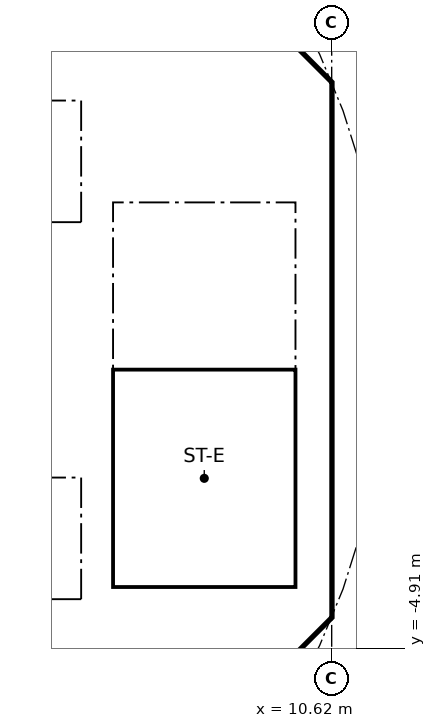
"""IFC4 building model, lengths in metres.
Left out: names, types, materials, properties, quantities, classifications, styles, units other than length and angle.
Written with IfcOpenShell. Run it as: python <this file> out.ifc"""

import sys

from ifc_helpers import new_model, si_unit, direction, frame, frame_2d, origin, place, context, subcontext, project, spatial, polyline, rectangle, outline, extrude, element, fill, save


model = new_model("IFC4")
c1 = context("Model", 3, precision=1e-05, world=origin(), true_north=direction((0.0, 1.0)))
c2 = subcontext(c1, "Body", "Model", "MODEL_VIEW")
j1 = project(units=[si_unit("LENGTHUNIT", "METRE"), si_unit("PLANEANGLEUNIT", "RADIAN")], contexts=[c1])
p1 = place(None, origin())
s1 = spatial("IfcSite", under=j1, at=p1, CompositionType="ELEMENT")
p2 = place(p1, origin())
s2 = spatial("IfcBuilding", under=s1, at=p2, CompositionType="ELEMENT")
p3 = place(p2, frame((0.0, 0.0, 184.4)))
s3 = spatial("IfcBuildingStorey", under=s2, at=p3, CompositionType="ELEMENT", Elevation=184.4)
p4 = place(p3, frame((9.988, 4.613, 0.0), z_axis=(0.0, 0.0, 1.0), x_axis=(-0.707106781187, 0.707106781187, 0.0)))
e1 = element("IfcWall", 1, at=p4, inside=s3, PredefinedType="SHEAR", context=c2, shape_type="SweptSolid", body=[
    extrude(rectangle(XDim=7.602, YDim=0.6, at=frame_2d((3.801, 0.0))), origin(), (0.0, 0.0, 1.0), 3.44),
])
p5 = place(p4, frame((3.201, 0.0, 0.0)))
e2 = element("IfcOpeningElement", 2, at=p5, cuts=e1, PredefinedType="OPENING", context=c2, shape_type="SweptSolid", body=[
    extrude(rectangle(XDim=1.2, YDim=2.1, at=frame_2d((0.6, 1.05))), frame((0.0, 0.31, 0.0), z_axis=(0.0, -1.0, 0.0), x_axis=(1.0, 0.0, 0.0)), (0.0, 0.0, 1.0), 0.62),
])
p6 = place(p3, frame((4.613, -9.988, 0.0), z_axis=(0.0, 0.0, 1.0), x_axis=(0.707106781187, 0.707106781187, 0.0)))
e3 = element("IfcWall", 3, at=p6, inside=s3, PredefinedType="SHEAR", context=c2, shape_type="SweptSolid", body=[
    extrude(rectangle(XDim=7.602, YDim=0.6, at=frame_2d((3.801, 0.0))), origin(), (0.0, 0.0, 1.0), 3.44),
])
p7 = place(p6, frame((3.201, 0.0, 0.0)))
e4 = element("IfcOpeningElement", 4, at=p7, cuts=e3, PredefinedType="OPENING", context=c2, shape_type="SweptSolid", body=[
    extrude(rectangle(XDim=1.2, YDim=2.1, at=frame_2d((0.6, 1.05))), frame((0.0, 0.31, 0.0), z_axis=(0.0, -1.0, 0.0), x_axis=(1.0, 0.0, 0.0)), (0.0, 0.0, 1.0), 0.62),
])
p8 = place(p3, frame((-6.7, 2.0, 0.0), z_axis=(0.0, 0.0, 1.0), x_axis=(1.0, 0.0, 0.0)))
e5 = element("IfcWall", 5, at=p8, inside=s3, PredefinedType="SOLIDWALL", context=c2, shape_type="SweptSolid", body=[
    extrude(rectangle(XDim=13.4, YDim=0.2, at=frame_2d((6.7, 0.0))), origin(), (0.0, 0.0, 1.0), 3.44),
])
p9 = place(p8, frame((7.25, 0.0, 0.0)))
e6 = element("IfcOpeningElement", 6, at=p9, cuts=e5, PredefinedType="OPENING", context=c2, shape_type="SweptSolid", body=[
    extrude(rectangle(XDim=1.1, YDim=2.1, at=frame_2d((0.55, 1.05))), frame((0.0, 0.11, 0.0), z_axis=(0.0, -1.0, 0.0), x_axis=(1.0, 0.0, 0.0)), (0.0, 0.0, 1.0), 0.22),
])
p10 = place(p8, frame((9.45, 0.0, 0.0)))
e7 = element("IfcOpeningElement", 7, at=p10, cuts=e5, PredefinedType="OPENING", context=c2, shape_type="SweptSolid", body=[
    extrude(rectangle(XDim=1.1, YDim=2.1, at=frame_2d((0.55, 1.05))), frame((0.0, 0.11, 0.0), z_axis=(0.0, -1.0, 0.0), x_axis=(1.0, 0.0, 0.0)), (0.0, 0.0, 1.0), 0.22),
])
p11 = place(p8, frame((1.85, 0.0, 0.0)))
e8 = element("IfcOpeningElement", 8, at=p11, cuts=e5, PredefinedType="OPENING", context=c2, shape_type="SweptSolid", body=[
    extrude(rectangle(XDim=0.9, YDim=2.1, at=frame_2d((0.45, 1.05))), frame((0.0, 0.11, 0.0), z_axis=(0.0, -1.0, 0.0), x_axis=(1.0, 0.0, 0.0)), (0.0, 0.0, 1.0), 0.22),
])
p12 = place(p8, frame((5.15, 0.0, 0.0)))
e9 = element("IfcOpeningElement", 9, at=p12, cuts=e5, PredefinedType="OPENING", context=c2, shape_type="SweptSolid", body=[
    extrude(rectangle(XDim=0.9, YDim=2.1, at=frame_2d((0.45, 1.05))), frame((0.0, 0.11, 0.0), z_axis=(0.0, -1.0, 0.0), x_axis=(1.0, 0.0, 0.0)), (0.0, 0.0, 1.0), 0.22),
])
p13 = place(p3, frame((6.7, 4.0, 0.0), z_axis=(0.0, 0.0, 1.0), x_axis=(1.0, 0.0, 0.0)))
e10 = element("IfcWall", 10, at=p13, inside=s3, PredefinedType="SOLIDWALL", context=c2, shape_type="SweptSolid", body=[
    extrude(rectangle(XDim=3.325, YDim=0.2, at=frame_2d((1.662, 0.0))), origin(), (0.0, 0.0, 1.0), 3.44),
])
p14 = place(p13, frame((1.25, 0.0, 0.0)))
e11 = element("IfcOpeningElement", 11, at=p14, cuts=e10, PredefinedType="OPENING", context=c2, shape_type="SweptSolid", body=[
    extrude(rectangle(XDim=1.1, YDim=2.1, at=frame_2d((0.55, 1.05))), frame((0.0, 0.11, 0.0), z_axis=(0.0, -1.0, 0.0), x_axis=(1.0, 0.0, 0.0)), (0.0, 0.0, 1.0), 0.22),
])
p15 = place(p3, frame((-6.7, -2.0, 0.0), z_axis=(0.0, 0.0, 1.0), x_axis=(1.0, 0.0, 0.0)))
e12 = element("IfcWall", 12, at=p15, inside=s3, PredefinedType="SOLIDWALL", context=c2, shape_type="SweptSolid", body=[
    extrude(rectangle(XDim=13.4, YDim=0.2, at=frame_2d((6.7, 0.0))), origin(), (0.0, 0.0, 1.0), 3.44),
])
p16 = place(p15, frame((5.05, 0.0, 0.0)))
e13 = element("IfcOpeningElement", 13, at=p16, cuts=e12, PredefinedType="OPENING", context=c2, shape_type="SweptSolid", body=[
    extrude(rectangle(XDim=1.1, YDim=2.1, at=frame_2d((0.55, 1.05))), frame((0.0, 0.11, 0.0), z_axis=(0.0, -1.0, 0.0), x_axis=(1.0, 0.0, 0.0)), (0.0, 0.0, 1.0), 0.22),
])
p17 = place(p15, frame((7.25, 0.0, 0.0)))
e14 = element("IfcOpeningElement", 14, at=p17, cuts=e12, PredefinedType="OPENING", context=c2, shape_type="SweptSolid", body=[
    extrude(rectangle(XDim=1.1, YDim=2.1, at=frame_2d((0.55, 1.05))), frame((0.0, 0.11, 0.0), z_axis=(0.0, -1.0, 0.0), x_axis=(1.0, 0.0, 0.0)), (0.0, 0.0, 1.0), 0.22),
])
p18 = place(p15, frame((1.85, 0.0, 0.0)))
e15 = element("IfcOpeningElement", 15, at=p18, cuts=e12, PredefinedType="OPENING", context=c2, shape_type="SweptSolid", body=[
    extrude(rectangle(XDim=0.9, YDim=2.1, at=frame_2d((0.45, 1.05))), frame((0.0, 0.11, 0.0), z_axis=(0.0, -1.0, 0.0), x_axis=(1.0, 0.0, 0.0)), (0.0, 0.0, 1.0), 0.22),
])
p19 = place(p3, origin())
e16 = element("IfcWall", 16, at=p19, inside=s3, PredefinedType="SHEAR", context=c2, shape_type="SweptSolid", body=[
    extrude(outline(polyline([(9.776, -4.401), (10.025, -4.152), (10.025, -3.801), (10.025, 4.152), (9.776, 4.401), (10.2, 4.825), (10.625, 4.401), (10.625, -4.401), (10.2, -4.825), (9.776, -4.401)])), origin(), (0.0, 0.0, 1.0), 3.44),
])
p20 = place(p3, origin())
e17 = element("IfcWall", 17, at=p20, inside=s3, PredefinedType="SOLIDWALL", context=c2, shape_type="SweptSolid", body=[
    extrude(outline(polyline([(-6.7, -2.1), (-6.5, -2.1), (-6.5, -4.1), (-2.3, -4.1), (-2.3, -2.1), (-2.1, -2.1), (-2.1, -4.1), (-0.1, -4.1), (-0.1, -2.1), (0.1, -2.1), (0.1, -4.1), (2.1, -4.1), (2.1, -2.1), (2.3, -2.1), (2.3, -4.1), (4.3, -4.1), (4.3, -2.1), (4.5, -2.1), (4.5, -4.1), (6.5, -4.1), (6.5, -2.1), (6.7, -2.1), (6.7, -4.3), (-6.7, -4.3), (-6.7, -2.1)])), origin(), (0.0, 0.0, 1.0), 3.44),
])
p21 = place(p3, origin())
e18 = element("IfcWall", 18, at=p21, inside=s3, PredefinedType="SOLIDWALL", context=c2, shape_type="SweptSolid", body=[
    extrude(outline(polyline([(-6.7, 4.3), (6.7, 4.3), (6.7, 2.1), (6.5, 2.1), (6.5, 4.1), (4.5, 4.1), (4.5, 2.1), (4.3, 2.1), (4.3, 4.1), (2.3, 4.1), (2.3, 2.1), (2.1, 2.1), (2.1, 4.1), (0.1, 4.1), (0.1, 2.1), (-0.1, 2.1), (-0.1, 4.1), (-2.1, 4.1), (-2.1, 2.1), (-2.3, 2.1), (-2.3, 4.1), (-6.5, 4.1), (-6.5, 2.1), (-6.7, 2.1), (-6.7, 4.3)])), origin(), (0.0, 0.0, 1.0), 3.44),
])
p22 = place(p3, origin())
e19 = element("IfcWall", 19, at=p22, inside=s3, PredefinedType="SOLIDWALL", context=c2, shape_type="SweptSolid", body=[
    extrude(outline(polyline([(7.025, -3.9), (6.7, -3.9), (6.7, 3.9), (7.025, 3.9), (7.025, -3.9)])), origin(), (0.0, 0.0, 1.0), 3.44),
])
p23 = place(p3, origin())
e20 = element("IfcWall", 20, at=p23, inside=s3, PredefinedType="SOLIDWALL", context=c2, shape_type="SweptSolid", body=[
    extrude(outline(polyline([(10.025, -4.1), (6.7, -4.1), (6.7, -3.9), (10.025, -3.9), (10.025, -4.1)])), origin(), (0.0, 0.0, 1.0), 3.44),
])
p24 = place(p14, frame((1.1, 0.0, 0.0), x_axis=(-1.0, 0.0, 0.0)))
e21 = element("IfcDoor", 21, at=p24, inside=s3, OperationType="SINGLE_SWING_RIGHT", PredefinedType="DOOR", context=c2, shape_type="SweptSolid", body=[
    extrude(rectangle(XDim=1.1, YDim=2.1, at=frame_2d((0.55, 1.05))), frame((0.0, 0.025, 0.0), z_axis=(0.0, -1.0, 0.0), x_axis=(1.0, 0.0, 0.0)), (0.0, 0.0, 1.0), 0.05),
])
fill(e11, e21)
save(model, sys.argv[1])
